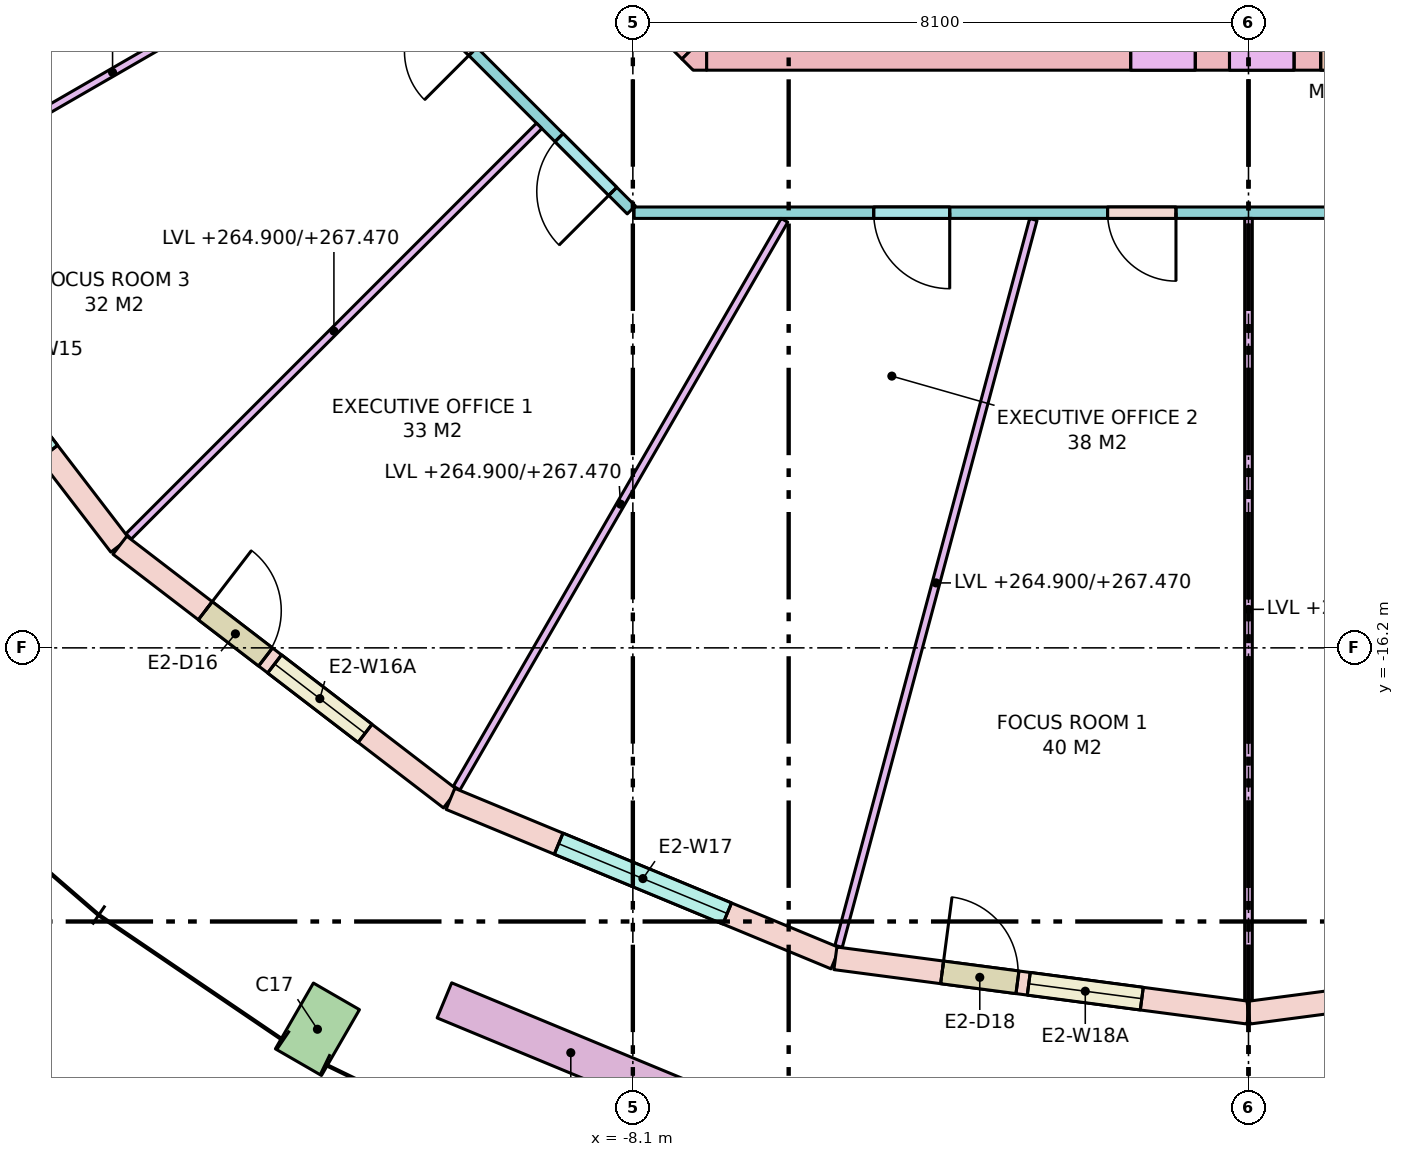
"""IFC4 building model, lengths in metres.
Left out: names, types, materials, properties, quantities, classifications, styles, units other than length and angle.
Written with IfcOpenShell. Run it as: python <this file> out.ifc"""

import sys

from ifc_helpers import new_model, si_unit, direction, frame, frame_2d, origin, origin_2d, place, context, subcontext, project, spatial, polyline, rectangle, outline, extrude, element, fill, save


model = new_model("IFC4")
c1 = context("Model", 3, precision=1e-05, world=origin(), true_north=direction((0.0, 1.0)))
c2 = subcontext(c1, "Body", "Model", "MODEL_VIEW")
j1 = project(units=[si_unit("LENGTHUNIT", "METRE"), si_unit("PLANEANGLEUNIT", "RADIAN")], contexts=[c1])
p1 = place(None, origin())
s1 = spatial("IfcSite", under=j1, at=p1, CompositionType="ELEMENT")
p2 = place(p1, origin())
s2 = spatial("IfcBuilding", under=s1, at=p2, CompositionType="ELEMENT")
p3 = place(p2, frame((0.0, 0.0, 264.9)))
s3 = spatial("IfcBuildingStorey", under=s2, at=p3, CompositionType="ELEMENT", Elevation=264.9)
p4 = place(p3, frame((-12.25, -21.218, 0.0), z_axis=(0.0, 0.0, 1.0), x_axis=(0.866025403784, -0.5, 0.0)))
e1 = element("IfcColumn", 1, at=p4, inside=s3, PredefinedType="COLUMN", context=c2, shape_type="SweptSolid", body=[
    extrude(rectangle(XDim=0.7, YDim=1.0, at=origin_2d()), origin(), (0.0, 0.0, 1.0), 3.7),
])
p5 = place(p3, frame((-7.13, -8.35, -0.28), z_axis=(0.0, 0.0, 1.0), x_axis=(1.0, 0.0, 0.0)))
e2 = element("IfcWall", 2, at=p5, inside=s3, PredefinedType="SHEAR", context=c2, shape_type="SweptSolid", body=[
    extrude(rectangle(XDim=14.26, YDim=0.5, at=frame_2d((7.13, 0.0))), origin(), (0.0, 0.0, 1.0), 3.7),
])
p6 = place(p5, frame((8.08, 0.0, 0.28)))
e3 = element("IfcOpeningElement", 3, at=p6, cuts=e2, PredefinedType="OPENING", context=c2, shape_type="SweptSolid", body=[
    extrude(rectangle(XDim=0.7, YDim=2.1, at=frame_2d((0.35, 1.05))), frame((0.0, 0.26, 0.0), z_axis=(0.0, -1.0, 0.0), x_axis=(1.0, 0.0, 0.0)), (0.0, 0.0, 1.0), 0.52),
])
p7 = place(p5, frame((5.58, 0.0, 0.28)))
e4 = element("IfcOpeningElement", 4, at=p7, cuts=e2, PredefinedType="OPENING", context=c2, shape_type="SweptSolid", body=[
    extrude(rectangle(XDim=0.85, YDim=2.1, at=frame_2d((0.425, 1.05))), frame((0.0, 0.26, 0.0), z_axis=(0.0, -1.0, 0.0), x_axis=(1.0, 0.0, 0.0)), (0.0, 0.0, 1.0), 0.52),
])
p8 = place(p5, frame((6.88, 0.0, 0.28)))
e5 = element("IfcOpeningElement", 5, at=p8, cuts=e2, PredefinedType="OPENING", context=c2, shape_type="SweptSolid", body=[
    extrude(rectangle(XDim=0.85, YDim=2.1, at=frame_2d((0.425, 1.05))), frame((0.0, 0.26, 0.0), z_axis=(0.0, -1.0, 0.0), x_axis=(1.0, 0.0, 0.0)), (0.0, 0.0, 1.0), 0.52),
])
p9 = place(p5, frame((9.445, 0.0, 0.28)))
e6 = element("IfcOpeningElement", 6, at=p9, cuts=e2, PredefinedType="OPENING", context=c2, shape_type="SweptSolid", body=[
    extrude(rectangle(XDim=0.9, YDim=2.1, at=frame_2d((0.45, 1.05))), frame((0.0, 0.26, 0.0), z_axis=(0.0, -1.0, 0.0), x_axis=(1.0, 0.0, 0.0)), (0.0, 0.0, 1.0), 0.52),
])
p10 = place(p5, frame((11.431, 0.0, 0.28)))
e7 = element("IfcOpeningElement", 7, at=p10, cuts=e2, PredefinedType="OPENING", context=c2, shape_type="SweptSolid", body=[
    extrude(rectangle(XDim=0.9, YDim=2.1, at=frame_2d((0.45, 1.05))), frame((0.0, 0.26, 0.0), z_axis=(0.0, -1.0, 0.0), x_axis=(1.0, 0.0, 0.0)), (0.0, 0.0, 1.0), 0.52),
])
p11 = place(p3, frame((-7.277, -8.277, -0.28), z_axis=(0.0, 0.0, 1.0), x_axis=(-0.707106781187, 0.707106781187, 0.0)))
e8 = element("IfcWall", 8, at=p11, inside=s3, PredefinedType="SHEAR", context=c2, shape_type="SweptSolid", body=[
    extrude(rectangle(XDim=4.243, YDim=0.5, at=frame_2d((2.121, 0.0))), origin(), (0.0, 0.0, 1.0), 3.7),
])
p12 = place(p11, frame((2.393, 0.0, 0.28)))
e9 = element("IfcOpeningElement", 9, at=p12, cuts=e8, PredefinedType="OPENING", context=c2, shape_type="SweptSolid", body=[
    extrude(rectangle(XDim=1.2, YDim=2.1, at=frame_2d((0.6, 1.05))), frame((0.0, 0.26, 0.0), z_axis=(0.0, -1.0, 0.0), x_axis=(1.0, 0.0, 0.0)), (0.0, 0.0, 1.0), 0.52),
])
p13 = place(p3, frame((0.0, 0.0, -0.28)))
e10 = element("IfcWall", 10, at=p13, inside=s3, PredefinedType="SHEAR", context=c2, shape_type="SweptSolid", body=[
    extrude(outline(polyline([(-7.307, -8.6), (-7.454, -8.454), (-7.13, -8.13), (-7.13, -8.6), (-7.307, -8.6)])), origin(), (0.0, 0.0, 1.0), 3.7),
])
p14 = place(p3, frame((-18.187, -10.5, 0.0), z_axis=(0.0, 0.0, 1.0), x_axis=(0.608784891166, -0.793335336593, 0.0)))
e11 = element("IfcWall", 11, at=p14, inside=s3, PredefinedType="STANDARD", context=c2, shape_type="SweptSolid", body=[
    extrude(rectangle(XDim=5.482, YDim=0.3, at=frame_2d((2.741, 0.0))), origin(), (0.0, 0.0, 1.0), 3.42),
])
p15 = place(p14, frame((1.541, 0.0, 0.8)))
e12 = element("IfcOpeningElement", 12, at=p15, cuts=e11, PredefinedType="OPENING", context=c2, shape_type="SweptSolid", body=[
    extrude(rectangle(XDim=2.4, YDim=2.4, at=frame_2d((1.2, 1.2))), frame((0.0, 0.16, 0.0), z_axis=(0.0, -1.0, 0.0), x_axis=(1.0, 0.0, 0.0)), (0.0, 0.0, 1.0), 0.32),
])
p16 = place(p3, frame((-14.849, -14.849, 0.0), z_axis=(0.0, 0.0, 1.0), x_axis=(0.793335336593, -0.608784891166, 0.0)))
e13 = element("IfcWall", 13, at=p16, inside=s3, PredefinedType="STANDARD", context=c2, shape_type="SweptSolid", body=[
    extrude(rectangle(XDim=5.482, YDim=0.3, at=frame_2d((2.741, 0.0))), origin(), (0.0, 0.0, 1.0), 3.42),
])
p17 = place(p16, frame((1.416, 0.0, 0.0)))
e14 = element("IfcOpeningElement", 14, at=p17, cuts=e13, PredefinedType="OPENING", context=c2, shape_type="SweptSolid", body=[
    extrude(rectangle(XDim=1.0, YDim=2.4, at=frame_2d((0.5, 1.2))), frame((0.0, 0.16, 0.0), z_axis=(0.0, -1.0, 0.0), x_axis=(1.0, 0.0, 0.0)), (0.0, 0.0, 1.0), 0.32),
])
p18 = place(p16, frame((2.566, 0.0, 0.8)))
e15 = element("IfcOpeningElement", 15, at=p18, cuts=e13, PredefinedType="OPENING", context=c2, shape_type="SweptSolid", body=[
    extrude(rectangle(XDim=1.5, YDim=2.4, at=frame_2d((0.75, 1.2))), frame((0.0, 0.16, 0.0), z_axis=(0.0, -1.0, 0.0), x_axis=(1.0, 0.0, 0.0)), (0.0, 0.0, 1.0), 0.32),
])
p19 = place(p3, frame((-10.5, -18.187, 0.0), z_axis=(0.0, 0.0, 1.0), x_axis=(0.923877333662, -0.382688740813, 0.0)))
e16 = element("IfcWall", 16, at=p19, inside=s3, PredefinedType="STANDARD", context=c2, shape_type="SweptSolid", body=[
    extrude(rectangle(XDim=5.482, YDim=0.3, at=frame_2d((2.741, 0.0))), origin(), (0.0, 0.0, 1.0), 3.42),
])
p20 = place(p19, frame((1.541, 0.0, 0.8)))
e17 = element("IfcOpeningElement", 17, at=p20, cuts=e16, PredefinedType="OPENING", context=c2, shape_type="SweptSolid", body=[
    extrude(rectangle(XDim=2.4, YDim=2.4, at=frame_2d((1.2, 1.2))), frame((0.0, 0.16, 0.0), z_axis=(0.0, -1.0, 0.0), x_axis=(1.0, 0.0, 0.0)), (0.0, 0.0, 1.0), 0.32),
])
p21 = place(p3, frame((-5.435, -20.284, 0.0), z_axis=(0.0, 0.0, 1.0), x_axis=(0.991444743541, -0.130527087244, 0.0)))
e18 = element("IfcWall", 18, at=p21, inside=s3, PredefinedType="STANDARD", context=c2, shape_type="SweptSolid", body=[
    extrude(rectangle(XDim=5.482, YDim=0.3, at=frame_2d((2.741, 0.0))), origin(), (0.0, 0.0, 1.0), 3.42),
])
p22 = place(p21, frame((1.416, 0.0, 0.0)))
e19 = element("IfcOpeningElement", 19, at=p22, cuts=e18, PredefinedType="OPENING", context=c2, shape_type="SweptSolid", body=[
    extrude(rectangle(XDim=1.0, YDim=2.4, at=frame_2d((0.5, 1.2))), frame((0.0, 0.16, 0.0), z_axis=(0.0, -1.0, 0.0), x_axis=(1.0, 0.0, 0.0)), (0.0, 0.0, 1.0), 0.32),
])
p23 = place(p21, frame((2.566, 0.0, 0.8)))
e20 = element("IfcOpeningElement", 20, at=p23, cuts=e18, PredefinedType="OPENING", context=c2, shape_type="SweptSolid", body=[
    extrude(rectangle(XDim=1.5, YDim=2.4, at=frame_2d((0.75, 1.2))), frame((0.0, 0.16, 0.0), z_axis=(0.0, -1.0, 0.0), x_axis=(1.0, 0.0, 0.0)), (0.0, 0.0, 1.0), 0.32),
])
p24 = place(p3, frame((0.0, -21.0, 0.0), z_axis=(0.0, 0.0, 1.0), x_axis=(0.991444743541, 0.130527087244, 0.0)))
e21 = element("IfcWall", 21, at=p24, inside=s3, PredefinedType="STANDARD", context=c2, shape_type="SweptSolid", body=[
    extrude(rectangle(XDim=5.482, YDim=0.3, at=frame_2d((2.741, 0.0))), origin(), (0.0, 0.0, 1.0), 3.42),
])
p25 = place(p24, frame((1.541, 0.0, 0.8)))
e22 = element("IfcOpeningElement", 22, at=p25, cuts=e21, PredefinedType="OPENING", context=c2, shape_type="SweptSolid", body=[
    extrude(rectangle(XDim=2.4, YDim=2.4, at=frame_2d((1.2, 1.2))), frame((0.0, 0.16, 0.0), z_axis=(0.0, -1.0, 0.0), x_axis=(1.0, 0.0, 0.0)), (0.0, 0.0, 1.0), 0.32),
])
p26 = place(p3, frame((-10.58, -20.838, 0.0), z_axis=(0.0, 0.0, 1.0), x_axis=(0.923909393783, -0.382611332921, 0.0)))
e23 = element("IfcWall", 23, at=p26, inside=s3, PredefinedType="PARAPET", context=c2, shape_type="SweptSolid", body=[
    extrude(rectangle(XDim=3.6, YDim=0.5, at=frame_2d((1.8, 0.0))), origin(), (0.0, 0.0, 1.0), 0.9),
])
p27 = place(p3, frame((8.084, -10.475, 0.0), z_axis=(0.0, 0.0, 1.0), x_axis=(-1.0, 0.0, 0.0)))
e24 = element("IfcWall", 24, at=p27, inside=s3, PredefinedType="PARTITIONING", context=c2, shape_type="SweptSolid", body=[
    extrude(rectangle(XDim=16.167, YDim=0.15, at=frame_2d((8.084, 0.0))), origin(), (0.0, 0.0, 1.0), 2.57),
])
p28 = place(p27, frame((12.015, 0.0, 0.0)))
e25 = element("IfcOpeningElement", 25, at=p28, cuts=e24, PredefinedType="OPENING", context=c2, shape_type="SweptSolid", body=[
    extrude(rectangle(XDim=1.0, YDim=2.1, at=frame_2d((0.5, 1.05))), frame((0.0, 0.085, 0.0), z_axis=(0.0, -1.0, 0.0), x_axis=(1.0, 0.0, 0.0)), (0.0, 0.0, 1.0), 0.17),
])
p29 = place(p27, frame((9.038, 0.0, 0.0)))
e26 = element("IfcOpeningElement", 26, at=p29, cuts=e24, PredefinedType="OPENING", context=c2, shape_type="SweptSolid", body=[
    extrude(rectangle(XDim=0.9, YDim=2.1, at=frame_2d((0.45, 1.05))), frame((0.0, 0.085, 0.0), z_axis=(0.0, -1.0, 0.0), x_axis=(1.0, 0.0, 0.0)), (0.0, 0.0, 1.0), 0.17),
])
p30 = place(p27, frame((3.167, 0.0, 0.0)))
e27 = element("IfcOpeningElement", 27, at=p30, cuts=e24, PredefinedType="OPENING", context=c2, shape_type="SweptSolid", body=[
    extrude(rectangle(XDim=1.8, YDim=2.1, at=frame_2d((0.9, 1.05))), frame((0.0, 0.085, 0.0), z_axis=(0.0, -1.0, 0.0), x_axis=(1.0, 0.0, 0.0)), (0.0, 0.0, 1.0), 0.17),
])
p31 = place(p3, frame((-8.121, -10.438, 0.0), z_axis=(0.0, 0.0, 1.0), x_axis=(-0.707106781187, 0.707106781187, 0.0)))
e28 = element("IfcWall", 28, at=p31, inside=s3, PredefinedType="PARTITIONING", context=c2, shape_type="SweptSolid", body=[
    extrude(rectangle(XDim=6.105, YDim=0.15, at=frame_2d((3.053, 0.0))), origin(), (0.0, 0.0, 1.0), 2.57),
])
p32 = place(p31, frame((0.344, 0.0, 0.0)))
e29 = element("IfcOpeningElement", 29, at=p32, cuts=e28, PredefinedType="OPENING", context=c2, shape_type="SweptSolid", body=[
    extrude(rectangle(XDim=1.0, YDim=2.1, at=frame_2d((0.5, 1.05))), frame((0.0, 0.085, 0.0), z_axis=(0.0, -1.0, 0.0), x_axis=(1.0, 0.0, 0.0)), (0.0, 0.0, 1.0), 0.17),
])
p33 = place(p31, frame((2.948, 0.0, 0.0)))
e30 = element("IfcOpeningElement", 30, at=p33, cuts=e28, PredefinedType="OPENING", context=c2, shape_type="SweptSolid", body=[
    extrude(rectangle(XDim=0.9, YDim=2.1, at=frame_2d((0.45, 1.05))), frame((0.0, 0.085, 0.0), z_axis=(0.0, -1.0, 0.0), x_axis=(1.0, 0.0, 0.0)), (0.0, 0.0, 1.0), 0.17),
])
p34 = place(p3, frame((-11.846, -6.839, 0.0), z_axis=(0.0, 0.0, 1.0), x_axis=(-0.866011787705, -0.500023583, 0.0)))
e31 = element("IfcWall", 31, at=p34, inside=s3, PredefinedType="PARTITIONING", context=c2, shape_type="SweptSolid", body=[
    extrude(rectangle(XDim=7.158, YDim=0.1, at=frame_2d((3.579, 0.0))), origin(), (0.0, 0.0, 1.0), 2.57),
])
p35 = place(p3, frame((-9.333, -9.333, 0.0), z_axis=(0.0, 0.0, 1.0), x_axis=(-0.707106781187, -0.707106781187, 0.0)))
e32 = element("IfcWall", 32, at=p35, inside=s3, PredefinedType="PARTITIONING", context=c2, shape_type="SweptSolid", body=[
    extrude(rectangle(XDim=7.639, YDim=0.1, at=frame_2d((3.819, 0.0))), origin(), (0.0, 0.0, 1.0), 2.57),
])
p36 = place(p3, frame((-6.105, -10.575, 0.0), z_axis=(0.0, 0.0, 1.0), x_axis=(-0.50001399067, -0.866017326117, 0.0)))
e33 = element("IfcWall", 33, at=p36, inside=s3, PredefinedType="PARTITIONING", context=c2, shape_type="SweptSolid", body=[
    extrude(rectangle(XDim=8.626, YDim=0.1, at=frame_2d((4.313, 0.0))), origin(), (0.0, 0.0, 1.0), 2.57),
])
p37 = place(p3, frame((-2.831, -10.564, 0.0), z_axis=(0.0, 0.0, 1.0), x_axis=(-0.258795254151, -0.965932200741, 0.0)))
e34 = element("IfcWall", 34, at=p37, inside=s3, PredefinedType="PARTITIONING", context=c2, shape_type="SweptSolid", body=[
    extrude(rectangle(XDim=9.9, YDim=0.1, at=frame_2d((4.95, 0.0))), origin(), (0.0, 0.0, 1.0), 2.57),
])
p38 = place(p3, frame((0.0, -10.55, 0.0), z_axis=(0.0, 0.0, 1.0), x_axis=(0.0, -1.0, 0.0)))
e35 = element("IfcWall", 35, at=p38, inside=s3, PredefinedType="PARTITIONING", context=c2, shape_type="SweptSolid", body=[
    extrude(rectangle(XDim=10.287, YDim=0.1, at=frame_2d((5.143, 0.0))), origin(), (0.0, 0.0, 1.0), 2.57),
])
p39 = place(p17, origin())
e36 = element("IfcDoor", 36, at=p39, inside=s3, OperationType="SINGLE_SWING_LEFT", PredefinedType="DOOR", context=c2, shape_type="SweptSolid", body=[
    extrude(rectangle(XDim=1.0, YDim=2.4, at=frame_2d((0.5, 1.2))), frame((0.0, 0.025, 0.0), z_axis=(0.0, -1.0, 0.0), x_axis=(1.0, 0.0, 0.0)), (0.0, 0.0, 1.0), 0.05),
])
fill(e14, e36)
p40 = place(p18, origin())
e37 = element("IfcWindow", 37, at=p40, inside=s3, PartitioningType="SINGLE_PANEL", PredefinedType="WINDOW", context=c2, shape_type="SweptSolid", body=[
    extrude(rectangle(XDim=1.5, YDim=2.4, at=frame_2d((0.75, 1.2))), frame((0.0, 0.03, 0.0), z_axis=(0.0, -1.0, 0.0), x_axis=(1.0, 0.0, 0.0)), (0.0, 0.0, 1.0), 0.06),
])
fill(e15, e37)
p41 = place(p20, origin())
e38 = element("IfcWindow", 38, at=p41, inside=s3, PartitioningType="SINGLE_PANEL", PredefinedType="WINDOW", context=c2, shape_type="SweptSolid", body=[
    extrude(rectangle(XDim=2.4, YDim=2.4, at=frame_2d((1.2, 1.2))), frame((0.0, 0.03, 0.0), z_axis=(0.0, -1.0, 0.0), x_axis=(1.0, 0.0, 0.0)), (0.0, 0.0, 1.0), 0.06),
])
fill(e17, e38)
p42 = place(p22, origin())
e39 = element("IfcDoor", 39, at=p42, inside=s3, OperationType="SINGLE_SWING_LEFT", PredefinedType="DOOR", context=c2, shape_type="SweptSolid", body=[
    extrude(rectangle(XDim=1.0, YDim=2.4, at=frame_2d((0.5, 1.2))), frame((0.0, 0.025, 0.0), z_axis=(0.0, -1.0, 0.0), x_axis=(1.0, 0.0, 0.0)), (0.0, 0.0, 1.0), 0.05),
])
fill(e19, e39)
p43 = place(p23, origin())
e40 = element("IfcWindow", 40, at=p43, inside=s3, PartitioningType="SINGLE_PANEL", PredefinedType="WINDOW", context=c2, shape_type="SweptSolid", body=[
    extrude(rectangle(XDim=1.5, YDim=2.4, at=frame_2d((0.75, 1.2))), frame((0.0, 0.03, 0.0), z_axis=(0.0, -1.0, 0.0), x_axis=(1.0, 0.0, 0.0)), (0.0, 0.0, 1.0), 0.06),
])
fill(e20, e40)
p44 = place(p6, origin())
e41 = element("IfcDoor", 41, at=p44, inside=s3, OperationType="SINGLE_SWING_RIGHT", PredefinedType="DOOR", context=c2, shape_type="SweptSolid", body=[
    extrude(rectangle(XDim=0.7, YDim=2.1, at=frame_2d((0.35, 1.05))), frame((0.0, 0.025, 0.0), z_axis=(0.0, -1.0, 0.0), x_axis=(1.0, 0.0, 0.0)), (0.0, 0.0, 1.0), 0.05),
])
fill(e3, e41)
p45 = place(p7, origin())
e42 = element("IfcDoor", 42, at=p45, inside=s3, OperationType="SINGLE_SWING_RIGHT", PredefinedType="DOOR", context=c2, shape_type="SweptSolid", body=[
    extrude(rectangle(XDim=0.85, YDim=2.1, at=frame_2d((0.425, 1.05))), frame((0.0, 0.025, 0.0), z_axis=(0.0, -1.0, 0.0), x_axis=(1.0, 0.0, 0.0)), (0.0, 0.0, 1.0), 0.05),
])
fill(e4, e42)
p46 = place(p8, origin())
e43 = element("IfcDoor", 43, at=p46, inside=s3, OperationType="SINGLE_SWING_LEFT", PredefinedType="DOOR", context=c2, shape_type="SweptSolid", body=[
    extrude(rectangle(XDim=0.85, YDim=2.1, at=frame_2d((0.425, 1.05))), frame((0.0, 0.025, 0.0), z_axis=(0.0, -1.0, 0.0), x_axis=(1.0, 0.0, 0.0)), (0.0, 0.0, 1.0), 0.05),
])
fill(e5, e43)
p47 = place(p32, origin())
e44 = element("IfcDoor", 44, at=p47, inside=s3, OperationType="SINGLE_SWING_LEFT", PredefinedType="DOOR", context=c2, shape_type="SweptSolid", body=[
    extrude(rectangle(XDim=1.0, YDim=2.1, at=frame_2d((0.5, 1.05))), frame((0.0, 0.025, 0.0), z_axis=(0.0, -1.0, 0.0), x_axis=(1.0, 0.0, 0.0)), (0.0, 0.0, 1.0), 0.05),
])
fill(e29, e44)
p48 = place(p28, origin())
e45 = element("IfcDoor", 45, at=p48, inside=s3, OperationType="SINGLE_SWING_LEFT", PredefinedType="DOOR", context=c2, shape_type="SweptSolid", body=[
    extrude(rectangle(XDim=1.0, YDim=2.1, at=frame_2d((0.5, 1.05))), frame((0.0, 0.025, 0.0), z_axis=(0.0, -1.0, 0.0), x_axis=(1.0, 0.0, 0.0)), (0.0, 0.0, 1.0), 0.05),
])
fill(e25, e45)
p49 = place(p29, origin())
e46 = element("IfcDoor", 46, at=p49, inside=s3, OperationType="SINGLE_SWING_LEFT", PredefinedType="DOOR", context=c2, shape_type="SweptSolid", body=[
    extrude(rectangle(XDim=0.9, YDim=2.1, at=frame_2d((0.45, 1.05))), frame((0.0, 0.025, 0.0), z_axis=(0.0, -1.0, 0.0), x_axis=(1.0, 0.0, 0.0)), (0.0, 0.0, 1.0), 0.05),
])
fill(e26, e46)
p50 = place(p33, origin())
e47 = element("IfcDoor", 47, at=p50, inside=s3, OperationType="SINGLE_SWING_LEFT", PredefinedType="DOOR", context=c2, shape_type="SweptSolid", body=[
    extrude(rectangle(XDim=0.9, YDim=2.1, at=frame_2d((0.45, 1.05))), frame((0.0, 0.025, 0.0), z_axis=(0.0, -1.0, 0.0), x_axis=(1.0, 0.0, 0.0)), (0.0, 0.0, 1.0), 0.05),
])
fill(e30, e47)
save(model, sys.argv[1])
